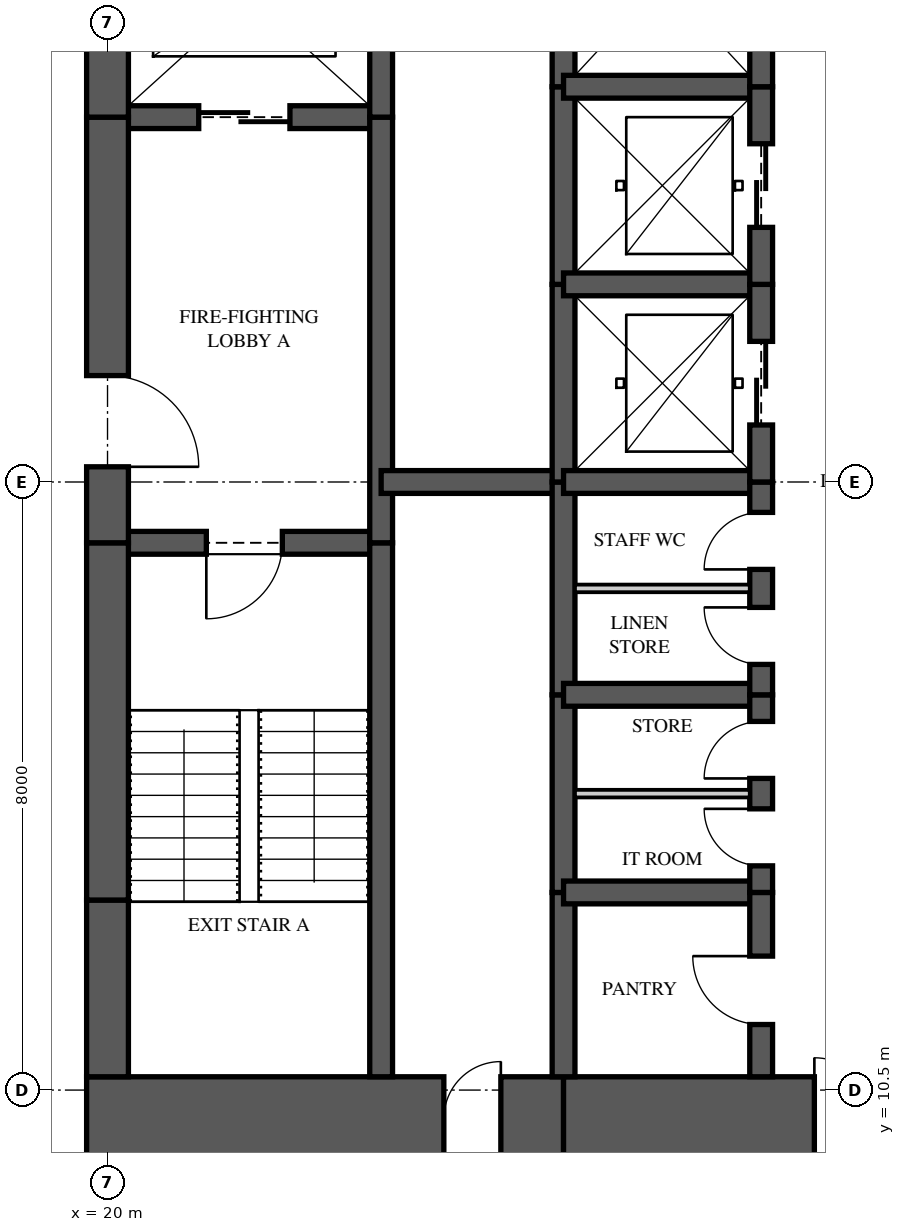
"""IFC4 building model, lengths in metres.
Left out: names, types, materials, properties, quantities, classifications, styles, units other than length and angle.
Written with IfcOpenShell. Run it as: python <this file> out.ifc"""

import sys

from ifc_helpers import new_model, si_unit, direction, frame, frame_2d, origin, place, context, subcontext, project, spatial, rectangle, extrude, element, fill, save


model = new_model("IFC4")
c1 = context("Model", 3, precision=1e-05, world=origin(), true_north=direction((0.0, 1.0)))
c2 = subcontext(c1, "Body", "Model", "MODEL_VIEW")
j1 = project(units=[si_unit("LENGTHUNIT", "METRE"), si_unit("PLANEANGLEUNIT", "RADIAN")], contexts=[c1])
p1 = place(None, origin())
s1 = spatial("IfcSite", under=j1, at=p1, CompositionType="ELEMENT")
p2 = place(p1, origin())
s2 = spatial("IfcBuilding", under=s1, at=p2, CompositionType="ELEMENT")
p3 = place(p2, frame((0.0, 0.0, 238.95)))
s3 = spatial("IfcBuildingStorey", under=s2, at=p3, CompositionType="ELEMENT", Elevation=238.95)
p4 = place(p3, frame((19.725, 10.125, 0.0), z_axis=(0.0, 0.0, 1.0), x_axis=(1.0, 0.0, 0.0)))
e1 = element("IfcWall", 1, at=p4, inside=s3, PredefinedType="SHEAR", context=c2, shape_type="SweptSolid", body=[
    extrude(rectangle(XDim=6.275, YDim=1.1, at=frame_2d((3.137, 0.0))), origin(), (0.0, 0.0, 1.0), 3.5),
])
p5 = place(p4, frame((4.7, 0.0, 0.0)))
e2 = element("IfcOpeningElement", 2, at=p5, cuts=e1, PredefinedType="OPENING", context=c2, shape_type="SweptSolid", body=[
    extrude(rectangle(XDim=0.75, YDim=2.1, at=frame_2d((0.375, 1.05))), frame((0.0, 0.56, 0.0), z_axis=(0.0, -1.0, 0.0), x_axis=(1.0, 0.0, 0.0)), (0.0, 0.0, 1.0), 1.12),
])
p6 = place(p3, frame((26.0, 10.125, 0.0), z_axis=(0.0, 0.0, 1.0), x_axis=(1.0, 0.0, 0.0)))
e3 = element("IfcWall", 3, at=p6, inside=s3, PredefinedType="SHEAR", context=c2, shape_type="SweptSolid", body=[
    extrude(rectangle(XDim=5.6, YDim=1.1, at=frame_2d((2.8, 0.0))), origin(), (0.0, 0.0, 1.0), 3.5),
])
p7 = place(p6, frame((3.3, 0.0, 0.0)))
e4 = element("IfcOpeningElement", 4, at=p7, cuts=e3, PredefinedType="OPENING", context=c2, shape_type="SweptSolid", body=[
    extrude(rectangle(XDim=1.6, YDim=2.1, at=frame_2d((0.8, 1.05))), frame((0.0, 0.56, 0.0), z_axis=(0.0, -1.0, 0.0), x_axis=(1.0, 0.0, 0.0)), (0.0, 0.0, 1.0), 1.12),
])
p8 = place(p3, frame((20.0, 26.325, 0.0), z_axis=(0.0, 0.0, 1.0), x_axis=(0.0, -1.0, 0.0)))
e5 = element("IfcWall", 5, at=p8, inside=s3, PredefinedType="SHEAR", context=c2, shape_type="SweptSolid", body=[
    extrude(rectangle(XDim=3.025, YDim=0.55, at=frame_2d((1.512, 0.0))), origin(), (0.0, 0.0, 1.0), 3.5),
])
p9 = place(p3, frame((20.0, 23.3, 0.0), z_axis=(0.0, 0.0, 1.0), x_axis=(0.0, -1.0, 0.0)))
e6 = element("IfcWall", 6, at=p9, inside=s3, PredefinedType="SHEAR", context=c2, shape_type="SweptSolid", body=[
    extrude(rectangle(XDim=5.6, YDim=0.55, at=frame_2d((2.8, 0.0))), origin(), (0.0, 0.0, 1.0), 3.5),
])
p10 = place(p9, frame((3.4, 0.0, 0.0)))
e7 = element("IfcOpeningElement", 7, at=p10, cuts=e6, PredefinedType="OPENING", context=c2, shape_type="SweptSolid", body=[
    extrude(rectangle(XDim=1.2, YDim=2.2, at=frame_2d((0.6, 1.1))), frame((0.0, 0.285, 0.0), z_axis=(0.0, -1.0, 0.0), x_axis=(1.0, 0.0, 0.0)), (0.0, 0.0, 1.0), 0.57),
])
p11 = place(p3, frame((20.0, 17.7, 0.0), z_axis=(0.0, 0.0, 1.0), x_axis=(0.0, -1.0, 0.0)))
e8 = element("IfcWall", 8, at=p11, inside=s3, PredefinedType="SHEAR", context=c2, shape_type="SweptSolid", body=[
    extrude(rectangle(XDim=4.7, YDim=0.55, at=frame_2d((2.35, 0.0))), origin(), (0.0, 0.0, 1.0), 3.5),
])
p12 = place(p3, frame((20.0, 13.0, 0.0), z_axis=(0.0, 0.0, 1.0), x_axis=(0.0, -1.0, 0.0)))
e9 = element("IfcWall", 9, at=p12, inside=s3, PredefinedType="SHEAR", context=c2, shape_type="SweptSolid", body=[
    extrude(rectangle(XDim=2.325, YDim=0.55, at=frame_2d((1.163, 0.0))), origin(), (0.0, 0.0, 1.0), 3.5),
])
p13 = place(p3, frame((23.6, 10.675, 0.0), z_axis=(0.0, 0.0, 1.0), x_axis=(0.0, 1.0, 0.0)))
e10 = element("IfcWall", 10, at=p13, inside=s3, PredefinedType="SHEAR", context=c2, shape_type="SweptSolid", body=[
    extrude(rectangle(XDim=7.025, YDim=0.3, at=frame_2d((3.512, 0.0))), origin(), (0.0, 0.0, 1.0), 3.5),
])
p14 = place(p3, frame((23.6, 17.7, 0.0), z_axis=(0.0, 0.0, 1.0), x_axis=(0.0, 1.0, 0.0)))
e11 = element("IfcWall", 11, at=p14, inside=s3, PredefinedType="SHEAR", context=c2, shape_type="SweptSolid", body=[
    extrude(rectangle(XDim=5.6, YDim=0.3, at=frame_2d((2.8, 0.0))), origin(), (0.0, 0.0, 1.0), 3.5),
])
p15 = place(p3, frame((23.6, 23.3, 0.0), z_axis=(0.0, 0.0, 1.0), x_axis=(0.0, 1.0, 0.0)))
e12 = element("IfcWall", 12, at=p15, inside=s3, PredefinedType="SHEAR", context=c2, shape_type="SweptSolid", body=[
    extrude(rectangle(XDim=3.025, YDim=0.3, at=frame_2d((1.512, 0.0))), origin(), (0.0, 0.0, 1.0), 3.5),
])
p16 = place(p3, frame((26.0, 10.675, 0.0), z_axis=(0.0, 0.0, 1.0), x_axis=(0.0, 1.0, 0.0)))
e13 = element("IfcWall", 13, at=p16, inside=s3, PredefinedType="SHEAR", context=c2, shape_type="SweptSolid", body=[
    extrude(rectangle(XDim=2.425, YDim=0.3, at=frame_2d((1.212, 0.0))), origin(), (0.0, 0.0, 1.0), 3.5),
])
p17 = place(p3, frame((26.0, 13.1, 0.0), z_axis=(0.0, 0.0, 1.0), x_axis=(0.0, 1.0, 0.0)))
e14 = element("IfcWall", 14, at=p17, inside=s3, PredefinedType="SHEAR", context=c2, shape_type="SweptSolid", body=[
    extrude(rectangle(XDim=2.6, YDim=0.3, at=frame_2d((1.3, 0.0))), origin(), (0.0, 0.0, 1.0), 3.5),
])
p18 = place(p3, frame((26.0, 15.7, 0.0), z_axis=(0.0, 0.0, 1.0), x_axis=(0.0, 1.0, 0.0)))
e15 = element("IfcWall", 15, at=p18, inside=s3, PredefinedType="SHEAR", context=c2, shape_type="SweptSolid", body=[
    extrude(rectangle(XDim=2.8, YDim=0.3, at=frame_2d((1.4, 0.0))), origin(), (0.0, 0.0, 1.0), 3.5),
])
p19 = place(p3, frame((26.0, 18.5, 0.0), z_axis=(0.0, 0.0, 1.0), x_axis=(0.0, 1.0, 0.0)))
e16 = element("IfcWall", 16, at=p19, inside=s3, PredefinedType="SHEAR", context=c2, shape_type="SweptSolid", body=[
    extrude(rectangle(XDim=2.6, YDim=0.3, at=frame_2d((1.3, 0.0))), origin(), (0.0, 0.0, 1.0), 3.5),
])
p20 = place(p3, frame((26.0, 21.1, 0.0), z_axis=(0.0, 0.0, 1.0), x_axis=(0.0, 1.0, 0.0)))
e17 = element("IfcWall", 17, at=p20, inside=s3, PredefinedType="SHEAR", context=c2, shape_type="SweptSolid", body=[
    extrude(rectangle(XDim=2.6, YDim=0.3, at=frame_2d((1.3, 0.0))), origin(), (0.0, 0.0, 1.0), 3.5),
])
p21 = place(p3, frame((26.0, 23.7, 0.0), z_axis=(0.0, 0.0, 1.0), x_axis=(0.0, 1.0, 0.0)))
e18 = element("IfcWall", 18, at=p21, inside=s3, PredefinedType="SHEAR", context=c2, shape_type="SweptSolid", body=[
    extrude(rectangle(XDim=2.625, YDim=0.3, at=frame_2d((1.312, 0.0))), origin(), (0.0, 0.0, 1.0), 3.5),
])
p22 = place(p3, frame((28.6, 10.675, 0.0), z_axis=(0.0, 0.0, 1.0), x_axis=(0.0, 1.0, 0.0)))
e19 = element("IfcWall", 19, at=p22, inside=s3, PredefinedType="SHEAR", context=c2, shape_type="SweptSolid", body=[
    extrude(rectangle(XDim=2.425, YDim=0.3, at=frame_2d((1.212, 0.0))), origin(), (0.0, 0.0, 1.0), 3.5),
])
p23 = place(p22, frame((0.688, 0.0, 0.0)))
e20 = element("IfcOpeningElement", 20, at=p23, cuts=e19, PredefinedType="OPENING", context=c2, shape_type="SweptSolid", body=[
    extrude(rectangle(XDim=0.9, YDim=2.1, at=frame_2d((0.45, 1.05))), frame((0.0, 0.16, 0.0), z_axis=(0.0, -1.0, 0.0), x_axis=(1.0, 0.0, 0.0)), (0.0, 0.0, 1.0), 0.32),
])
p24 = place(p3, frame((28.6, 13.1, 0.0), z_axis=(0.0, 0.0, 1.0), x_axis=(0.0, 1.0, 0.0)))
e21 = element("IfcWall", 21, at=p24, inside=s3, PredefinedType="SHEAR", context=c2, shape_type="SweptSolid", body=[
    extrude(rectangle(XDim=2.6, YDim=0.3, at=frame_2d((1.3, 0.0))), origin(), (0.0, 0.0, 1.0), 3.5),
])
p25 = place(p24, frame((0.35, 0.0, 0.0)))
e22 = element("IfcOpeningElement", 22, at=p25, cuts=e21, PredefinedType="OPENING", context=c2, shape_type="SweptSolid", body=[
    extrude(rectangle(XDim=0.75, YDim=2.1, at=frame_2d((0.375, 1.05))), frame((0.0, 0.16, 0.0), z_axis=(0.0, -1.0, 0.0), x_axis=(1.0, 0.0, 0.0)), (0.0, 0.0, 1.0), 0.32),
])
p26 = place(p24, frame((1.5, 0.0, 0.0)))
e23 = element("IfcOpeningElement", 23, at=p26, cuts=e21, PredefinedType="OPENING", context=c2, shape_type="SweptSolid", body=[
    extrude(rectangle(XDim=0.75, YDim=2.1, at=frame_2d((0.375, 1.05))), frame((0.0, 0.16, 0.0), z_axis=(0.0, -1.0, 0.0), x_axis=(1.0, 0.0, 0.0)), (0.0, 0.0, 1.0), 0.32),
])
p27 = place(p3, frame((28.6, 15.7, 0.0), z_axis=(0.0, 0.0, 1.0), x_axis=(0.0, 1.0, 0.0)))
e24 = element("IfcWall", 24, at=p27, inside=s3, PredefinedType="SHEAR", context=c2, shape_type="SweptSolid", body=[
    extrude(rectangle(XDim=2.8, YDim=0.3, at=frame_2d((1.4, 0.0))), origin(), (0.0, 0.0, 1.0), 3.5),
])
p28 = place(p27, frame((0.4, 0.0, 0.0)))
e25 = element("IfcOpeningElement", 25, at=p28, cuts=e24, PredefinedType="OPENING", context=c2, shape_type="SweptSolid", body=[
    extrude(rectangle(XDim=0.75, YDim=2.1, at=frame_2d((0.375, 1.05))), frame((0.0, 0.16, 0.0), z_axis=(0.0, -1.0, 0.0), x_axis=(1.0, 0.0, 0.0)), (0.0, 0.0, 1.0), 0.32),
])
p29 = place(p27, frame((1.65, 0.0, 0.0)))
e26 = element("IfcOpeningElement", 26, at=p29, cuts=e24, PredefinedType="OPENING", context=c2, shape_type="SweptSolid", body=[
    extrude(rectangle(XDim=0.75, YDim=2.1, at=frame_2d((0.375, 1.05))), frame((0.0, 0.16, 0.0), z_axis=(0.0, -1.0, 0.0), x_axis=(1.0, 0.0, 0.0)), (0.0, 0.0, 1.0), 0.32),
])
p30 = place(p3, frame((28.6, 18.5, 0.0), z_axis=(0.0, 0.0, 1.0), x_axis=(0.0, 1.0, 0.0)))
e27 = element("IfcWall", 27, at=p30, inside=s3, PredefinedType="SHEAR", context=c2, shape_type="SweptSolid", body=[
    extrude(rectangle(XDim=2.6, YDim=0.3, at=frame_2d((1.3, 0.0))), origin(), (0.0, 0.0, 1.0), 3.5),
])
p31 = place(p30, frame((0.75, 0.0, 0.0)))
e28 = element("IfcOpeningElement", 28, at=p31, cuts=e27, PredefinedType="OPENING", context=c2, shape_type="SweptSolid", body=[
    extrude(rectangle(XDim=1.1, YDim=2.1, at=frame_2d((0.55, 1.05))), frame((0.0, 0.16, 0.0), z_axis=(0.0, -1.0, 0.0), x_axis=(1.0, 0.0, 0.0)), (0.0, 0.0, 1.0), 0.32),
])
p32 = place(p3, frame((28.6, 21.1, 0.0), z_axis=(0.0, 0.0, 1.0), x_axis=(0.0, 1.0, 0.0)))
e29 = element("IfcWall", 29, at=p32, inside=s3, PredefinedType="SHEAR", context=c2, shape_type="SweptSolid", body=[
    extrude(rectangle(XDim=2.6, YDim=0.3, at=frame_2d((1.3, 0.0))), origin(), (0.0, 0.0, 1.0), 3.5),
])
p33 = place(p32, frame((0.75, 0.0, 0.0)))
e30 = element("IfcOpeningElement", 30, at=p33, cuts=e29, PredefinedType="OPENING", context=c2, shape_type="SweptSolid", body=[
    extrude(rectangle(XDim=1.1, YDim=2.1, at=frame_2d((0.55, 1.05))), frame((0.0, 0.16, 0.0), z_axis=(0.0, -1.0, 0.0), x_axis=(1.0, 0.0, 0.0)), (0.0, 0.0, 1.0), 0.32),
])
p34 = place(p3, frame((28.6, 23.7, 0.0), z_axis=(0.0, 0.0, 1.0), x_axis=(0.0, 1.0, 0.0)))
e31 = element("IfcWall", 31, at=p34, inside=s3, PredefinedType="SHEAR", context=c2, shape_type="SweptSolid", body=[
    extrude(rectangle(XDim=2.625, YDim=0.3, at=frame_2d((1.312, 0.0))), origin(), (0.0, 0.0, 1.0), 3.5),
])
p35 = place(p34, frame((0.85, 0.0, 0.0)))
e32 = element("IfcOpeningElement", 32, at=p35, cuts=e31, PredefinedType="OPENING", context=c2, shape_type="SweptSolid", body=[
    extrude(rectangle(XDim=1.1, YDim=2.1, at=frame_2d((0.55, 1.05))), frame((0.0, 0.16, 0.0), z_axis=(0.0, -1.0, 0.0), x_axis=(1.0, 0.0, 0.0)), (0.0, 0.0, 1.0), 0.32),
])
p36 = place(p3, frame((20.0, 17.7, 0.0), z_axis=(0.0, 0.0, 1.0), x_axis=(1.0, 0.0, 0.0)))
e33 = element("IfcWall", 33, at=p36, inside=s3, PredefinedType="SHEAR", context=c2, shape_type="SweptSolid", body=[
    extrude(rectangle(XDim=3.6, YDim=0.3, at=frame_2d((1.8, 0.0))), origin(), (0.0, 0.0, 1.0), 3.5),
])
p37 = place(p36, frame((1.3, 0.0, 0.0)))
e34 = element("IfcOpeningElement", 34, at=p37, cuts=e33, PredefinedType="OPENING", context=c2, shape_type="SweptSolid", body=[
    extrude(rectangle(XDim=1.0, YDim=2.1, at=frame_2d((0.5, 1.05))), frame((0.0, 0.16, 0.0), z_axis=(0.0, -1.0, 0.0), x_axis=(1.0, 0.0, 0.0)), (0.0, 0.0, 1.0), 0.32),
])
p38 = place(p3, frame((20.0, 23.3, 0.0), z_axis=(0.0, 0.0, 1.0), x_axis=(1.0, 0.0, 0.0)))
e35 = element("IfcWall", 35, at=p38, inside=s3, PredefinedType="SHEAR", context=c2, shape_type="SweptSolid", body=[
    extrude(rectangle(XDim=3.6, YDim=0.3, at=frame_2d((1.8, 0.0))), origin(), (0.0, 0.0, 1.0), 3.5),
])
p39 = place(p38, frame((1.2, 0.0, 0.0)))
e36 = element("IfcOpeningElement", 36, at=p39, cuts=e35, PredefinedType="OPENING", context=c2, shape_type="SweptSolid", body=[
    extrude(rectangle(XDim=1.2, YDim=2.1, at=frame_2d((0.6, 1.05))), frame((0.0, 0.16, 0.0), z_axis=(0.0, -1.0, 0.0), x_axis=(1.0, 0.0, 0.0)), (0.0, 0.0, 1.0), 0.32),
])
p40 = place(p3, frame((23.6, 18.5, 0.0), z_axis=(0.0, 0.0, 1.0), x_axis=(1.0, 0.0, 0.0)))
e37 = element("IfcWall", 37, at=p40, inside=s3, PredefinedType="SHEAR", context=c2, shape_type="SweptSolid", body=[
    extrude(rectangle(XDim=2.4, YDim=0.3, at=frame_2d((1.2, 0.0))), origin(), (0.0, 0.0, 1.0), 3.5),
])
for number, where, z_axis, x_axis in (
    (38, (26.0, 13.1, 0.0), (0.0, 0.0, 1.0), (1.0, 0.0, 0.0)),
    (39, (26.0, 15.7, 0.0), (0.0, 0.0, 1.0), (1.0, 0.0, 0.0)),
    (40, (26.0, 18.5, 0.0), (0.0, 0.0, 1.0), (1.0, 0.0, 0.0)),
    (41, (26.0, 21.1, 0.0), (0.0, 0.0, 1.0), (1.0, 0.0, 0.0)),
    (42, (26.0, 23.7, 0.0), (0.0, 0.0, 1.0), (1.0, 0.0, 0.0)),
):
    element("IfcWall", number, at=place(p3, frame(where, z_axis=z_axis, x_axis=x_axis)), inside=s3, PredefinedType="SHEAR", context=c2, shape_type="SweptSolid", body=[
        extrude(rectangle(XDim=2.6, YDim=0.3, at=frame_2d((1.3, 0.0))), origin(), (0.0, 0.0, 1.0), 3.5),
    ])
for number, where, z_axis, x_axis in (
    (43, (26.15, 14.4, 0.0), (0.0, 0.0, 1.0), (1.0, 0.0, 0.0)),
    (44, (26.15, 17.1, 0.0), (0.0, 0.0, 1.0), (1.0, 0.0, 0.0)),
):
    element("IfcWall", number, at=place(p3, frame(where, z_axis=z_axis, x_axis=x_axis)), inside=s3, PredefinedType="PARTITIONING", context=c2, shape_type="SweptSolid", body=[
        extrude(rectangle(XDim=2.3, YDim=0.1, at=frame_2d((1.15, 0.0))), origin(), (0.0, 0.0, 1.0), 3.26),
    ])
p41 = place(p37, frame((1.0, 0.0, 0.0), z_axis=(0.0, 0.0, 1.0), x_axis=(-1.0, 0.0, 0.0)))
e45 = element("IfcDoor", 45, at=p41, inside=s3, OperationType="SINGLE_SWING_RIGHT", PredefinedType="DOOR", context=c2, shape_type="SweptSolid", body=[
    extrude(rectangle(XDim=1.0, YDim=2.1, at=frame_2d((0.5, 1.05))), frame((0.0, 0.025, 0.0), z_axis=(0.0, -1.0, 0.0), x_axis=(1.0, 0.0, 0.0)), (0.0, 0.0, 1.0), 0.05),
])
fill(e34, e45)
p42 = place(p10, origin())
e46 = element("IfcDoor", 46, at=p42, inside=s3, OperationType="SINGLE_SWING_RIGHT", PredefinedType="DOOR", context=c2, shape_type="SweptSolid", body=[
    extrude(rectangle(XDim=1.2, YDim=2.2, at=frame_2d((0.6, 1.1))), frame((0.0, 0.025, 0.0), z_axis=(0.0, -1.0, 0.0), x_axis=(1.0, 0.0, 0.0)), (0.0, 0.0, 1.0), 0.05),
])
fill(e7, e46)
p43 = place(p39, origin())
e47 = element("IfcDoor", 47, at=p43, inside=s3, OperationType="SLIDING_TO_LEFT", PredefinedType="DOOR", context=c2, shape_type="SweptSolid", body=[
    extrude(rectangle(XDim=1.2, YDim=2.1, at=frame_2d((0.6, 1.05))), frame((0.0, 0.025, 0.0), z_axis=(0.0, -1.0, 0.0), x_axis=(1.0, 0.0, 0.0)), (0.0, 0.0, 1.0), 0.05),
])
fill(e36, e47)
p44 = place(p31, origin())
e48 = element("IfcDoor", 48, at=p44, inside=s3, OperationType="SLIDING_TO_LEFT", PredefinedType="DOOR", context=c2, shape_type="SweptSolid", body=[
    extrude(rectangle(XDim=1.1, YDim=2.1, at=frame_2d((0.55, 1.05))), frame((0.0, 0.025, 0.0), z_axis=(0.0, -1.0, 0.0), x_axis=(1.0, 0.0, 0.0)), (0.0, 0.0, 1.0), 0.05),
])
fill(e28, e48)
p45 = place(p33, origin())
e49 = element("IfcDoor", 49, at=p45, inside=s3, OperationType="SLIDING_TO_LEFT", PredefinedType="DOOR", context=c2, shape_type="SweptSolid", body=[
    extrude(rectangle(XDim=1.1, YDim=2.1, at=frame_2d((0.55, 1.05))), frame((0.0, 0.025, 0.0), z_axis=(0.0, -1.0, 0.0), x_axis=(1.0, 0.0, 0.0)), (0.0, 0.0, 1.0), 0.05),
])
fill(e30, e49)
p46 = place(p23, origin())
e50 = element("IfcDoor", 50, at=p46, inside=s3, OperationType="SINGLE_SWING_RIGHT", PredefinedType="DOOR", context=c2, shape_type="SweptSolid", body=[
    extrude(rectangle(XDim=0.9, YDim=2.1, at=frame_2d((0.45, 1.05))), frame((0.0, 0.025, 0.0), z_axis=(0.0, -1.0, 0.0), x_axis=(1.0, 0.0, 0.0)), (0.0, 0.0, 1.0), 0.05),
])
fill(e20, e50)
p47 = place(p25, origin())
e51 = element("IfcDoor", 51, at=p47, inside=s3, OperationType="SINGLE_SWING_RIGHT", PredefinedType="DOOR", context=c2, shape_type="SweptSolid", body=[
    extrude(rectangle(XDim=0.75, YDim=2.1, at=frame_2d((0.375, 1.05))), frame((0.0, 0.025, 0.0), z_axis=(0.0, -1.0, 0.0), x_axis=(1.0, 0.0, 0.0)), (0.0, 0.0, 1.0), 0.05),
])
fill(e22, e51)
p48 = place(p26, origin())
e52 = element("IfcDoor", 52, at=p48, inside=s3, OperationType="SINGLE_SWING_LEFT", PredefinedType="DOOR", context=c2, shape_type="SweptSolid", body=[
    extrude(rectangle(XDim=0.75, YDim=2.1, at=frame_2d((0.375, 1.05))), frame((0.0, 0.025, 0.0), z_axis=(0.0, -1.0, 0.0), x_axis=(1.0, 0.0, 0.0)), (0.0, 0.0, 1.0), 0.05),
])
fill(e23, e52)
p49 = place(p28, origin())
e53 = element("IfcDoor", 53, at=p49, inside=s3, OperationType="SINGLE_SWING_RIGHT", PredefinedType="DOOR", context=c2, shape_type="SweptSolid", body=[
    extrude(rectangle(XDim=0.75, YDim=2.1, at=frame_2d((0.375, 1.05))), frame((0.0, 0.025, 0.0), z_axis=(0.0, -1.0, 0.0), x_axis=(1.0, 0.0, 0.0)), (0.0, 0.0, 1.0), 0.05),
])
fill(e25, e53)
p50 = place(p29, origin())
e54 = element("IfcDoor", 54, at=p50, inside=s3, OperationType="SINGLE_SWING_LEFT", PredefinedType="DOOR", context=c2, shape_type="SweptSolid", body=[
    extrude(rectangle(XDim=0.75, YDim=2.1, at=frame_2d((0.375, 1.05))), frame((0.0, 0.025, 0.0), z_axis=(0.0, -1.0, 0.0), x_axis=(1.0, 0.0, 0.0)), (0.0, 0.0, 1.0), 0.05),
])
fill(e26, e54)
p51 = place(p7, origin())
e55 = element("IfcDoor", 55, at=p51, inside=s3, OperationType="DOUBLE_DOOR_SINGLE_SWING", PredefinedType="DOOR", context=c2, shape_type="SweptSolid", body=[
    extrude(rectangle(XDim=1.6, YDim=2.1, at=frame_2d((0.8, 1.05))), frame((0.0, 0.025, 0.0), z_axis=(0.0, -1.0, 0.0), x_axis=(1.0, 0.0, 0.0)), (0.0, 0.0, 1.0), 0.05),
])
fill(e4, e55)
p52 = place(p5, origin())
e56 = element("IfcDoor", 56, at=p52, inside=s3, OperationType="SINGLE_SWING_RIGHT", PredefinedType="DOOR", context=c2, shape_type="SweptSolid", body=[
    extrude(rectangle(XDim=0.75, YDim=2.1, at=frame_2d((0.375, 1.05))), frame((0.0, 0.025, 0.0), z_axis=(0.0, -1.0, 0.0), x_axis=(1.0, 0.0, 0.0)), (0.0, 0.0, 1.0), 0.05),
])
fill(e2, e56)
save(model, sys.argv[1])
